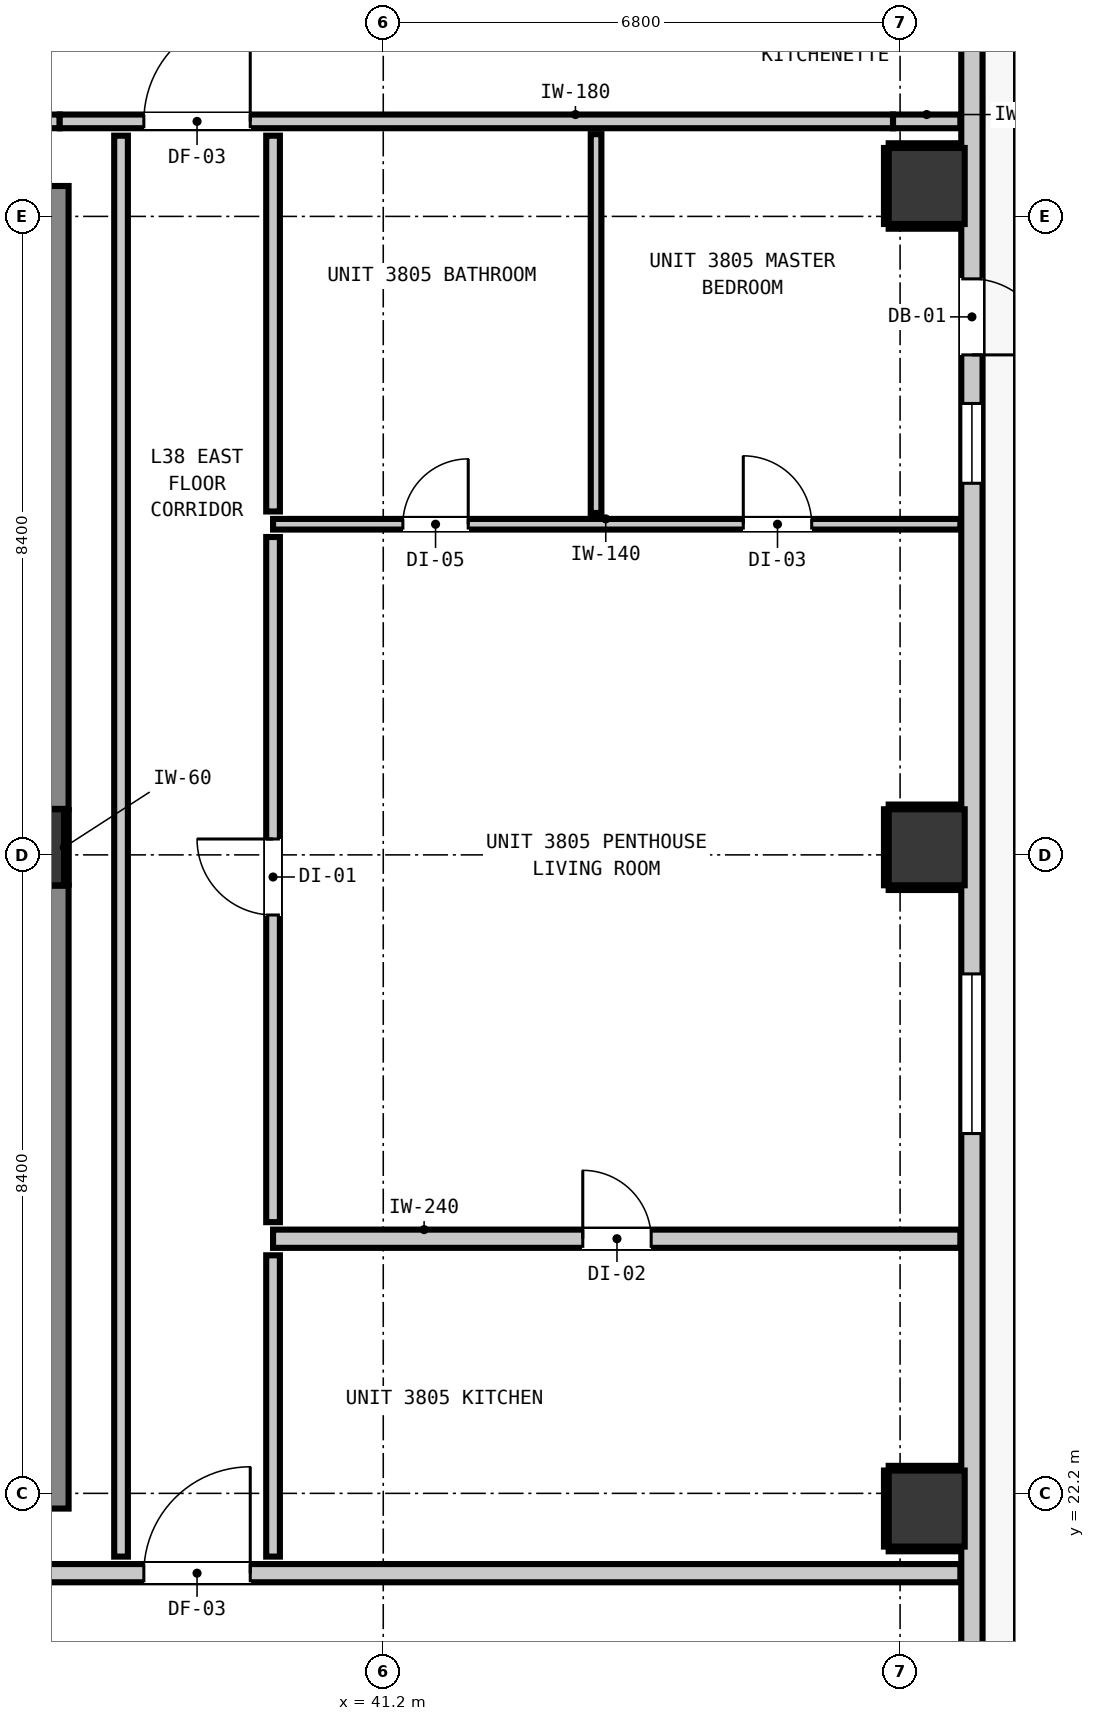
"""IFC4 building model, lengths in metres.
Left out: names, types, materials, properties, quantities, classifications, styles, units other than length and angle.
Written with IfcOpenShell. Run it as: python <this file> out.ifc"""

import sys

from ifc_helpers import new_model, si_unit, direction, frame, frame_2d, origin, origin_2d, place, context, subcontext, project, spatial, rectangle, extrude, element, fill, save


model = new_model("IFC4")
c1 = context("Model", 3, precision=1e-05, world=origin(), true_north=direction((0.0, 1.0)))
c2 = subcontext(c1, "Body", "Model", "MODEL_VIEW")
j1 = project(units=[si_unit("LENGTHUNIT", "METRE"), si_unit("PLANEANGLEUNIT", "RADIAN")], contexts=[c1])
p1 = place(None, origin())
s1 = spatial("IfcSite", under=j1, at=p1, CompositionType="ELEMENT")
p2 = place(p1, origin())
s2 = spatial("IfcBuilding", under=s1, at=p2, CompositionType="ELEMENT")
p3 = place(p2, frame((0.0, 0.0, 132.64)))
s3 = spatial("IfcBuildingStorey", under=s2, at=p3, CompositionType="ELEMENT", Elevation=132.64)
p4 = place(p3, frame((36.5, 30.7, 0.0), z_axis=(0.0, 0.0, 1.0), x_axis=(1.0, 0.0, 0.0)))
e1 = element("IfcColumn", 1, at=p4, inside=s3, PredefinedType="COLUMN", context=c2, shape_type="SweptSolid", body=[
    extrude(rectangle(XDim=1.0, YDim=1.0, at=origin_2d()), origin(), (0.0, 0.0, 1.0), 3.32),
])
p5 = place(p3, frame((36.56, 22.0, 0.0), z_axis=(0.0, 0.0, 1.0), x_axis=(0.0, 1.0, 0.0)))
e2 = element("IfcWall", 2, at=p5, inside=s3, PredefinedType="SHEAR", context=c2, shape_type="SweptSolid", body=[
    extrude(rectangle(XDim=8.195, YDim=1.0, at=frame_2d((4.098, 0.0))), origin(), (0.0, 0.0, 1.0), 3.32),
])
p6 = place(p3, frame((36.56, 31.205, 0.0), z_axis=(0.0, 0.0, 1.0), x_axis=(0.0, 1.0, 0.0)))
e3 = element("IfcWall", 3, at=p6, inside=s3, PredefinedType="SHEAR", context=c2, shape_type="SweptSolid", body=[
    extrude(rectangle(XDim=8.195, YDim=1.0, at=frame_2d((4.097, 0.0))), origin(), (0.0, 0.0, 1.0), 3.32),
])
for number, where, z_axis, x_axis in (
    (4, (48.35, 22.0, 0.0), (0.0, 0.0, 1.0), (1.0, 0.0, 0.0)),
    (5, (48.35, 30.7, 0.0), (0.0, 0.0, 1.0), (1.0, 0.0, 0.0)),
    (6, (48.35, 39.4, 0.0), (0.0, 0.0, 1.0), (1.0, 0.0, 0.0)),
):
    element("IfcColumn", number, at=place(p3, frame(where, z_axis=z_axis, x_axis=x_axis)), inside=s3, PredefinedType="COLUMN", context=c2, shape_type="SweptSolid", body=[
        extrude(rectangle(XDim=1.0, YDim=1.0, at=origin_2d()), origin(), (0.0, 0.0, 1.0), 3.32),
    ])
p7 = place(p3, frame((48.945, 43.645, 0.0), z_axis=(0.0, 0.0, 1.0), x_axis=(0.0, -1.0, 0.0)))
e7 = element("IfcWall", 7, at=p7, inside=s3, PredefinedType="STANDARD", context=c2, shape_type="SweptSolid", body=[
    extrude(rectangle(XDim=32.29, YDim=0.28, at=frame_2d((16.145, 0.0))), origin(), (0.0, 0.0, 1.0), 3.08),
])
p8 = place(p7, frame((5.467, 0.0, 0.0)))
e8 = element("IfcOpeningElement", 8, at=p8, cuts=e7, PredefinedType="OPENING", context=c2, shape_type="SweptSolid", body=[
    extrude(rectangle(XDim=1.0, YDim=2.15, at=frame_2d((0.5, 1.075))), frame((0.0, 0.15, 0.0), z_axis=(0.0, -1.0, 0.0), x_axis=(1.0, 0.0, 0.0)), (0.0, 0.0, 1.0), 0.3),
])
p9 = place(p7, frame((30.696, 0.0, 0.85)))
e9 = element("IfcOpeningElement", 9, at=p9, cuts=e7, PredefinedType="OPENING", context=c2, shape_type="SweptSolid", body=[
    extrude(rectangle(XDim=1.05, YDim=1.65, at=frame_2d((0.525, 0.825))), frame((0.0, 0.15, 0.0), z_axis=(0.0, -1.0, 0.0), x_axis=(1.0, 0.0, 0.0)), (0.0, 0.0, 1.0), 0.3),
])
p10 = place(p7, frame((14.611, 0.0, 0.85)))
e10 = element("IfcOpeningElement", 10, at=p10, cuts=e7, PredefinedType="OPENING", context=c2, shape_type="SweptSolid", body=[
    extrude(rectangle(XDim=2.1, YDim=1.9, at=frame_2d((1.05, 0.95))), frame((0.0, 0.15, 0.0), z_axis=(0.0, -1.0, 0.0), x_axis=(1.0, 0.0, 0.0)), (0.0, 0.0, 1.0), 0.3),
])
p11 = place(p7, frame((7.106, 0.0, 0.85)))
e11 = element("IfcOpeningElement", 11, at=p11, cuts=e7, PredefinedType="OPENING", context=c2, shape_type="SweptSolid", body=[
    extrude(rectangle(XDim=1.05, YDim=1.65, at=frame_2d((0.525, 0.825))), frame((0.0, 0.15, 0.0), z_axis=(0.0, -1.0, 0.0), x_axis=(1.0, 0.0, 0.0)), (0.0, 0.0, 1.0), 0.3),
])
p12 = place(p3, frame((9.407, 21.15, 0.0), z_axis=(0.0, 0.0, 1.0), x_axis=(1.0, 0.0, 0.0)))
e12 = element("IfcWall", 12, at=p12, inside=s3, PredefinedType="PARTITIONING", context=c2, shape_type="SweptSolid", body=[
    extrude(rectangle(XDim=39.386, YDim=0.24, at=frame_2d((19.693, 0.0))), origin(), (0.0, 0.0, 1.0), 3.08),
])
p13 = place(p12, frame((8.803, 0.0, 0.0)))
e13 = element("IfcOpeningElement", 13, at=p13, cuts=e12, PredefinedType="OPENING", context=c2, shape_type="SweptSolid", body=[
    extrude(rectangle(XDim=1.1, YDim=2.15, at=frame_2d((0.55, 1.075))), frame((0.0, 0.13, 0.0), z_axis=(0.0, -1.0, 0.0), x_axis=(1.0, 0.0, 0.0)), (0.0, 0.0, 1.0), 0.26),
])
p14 = place(p12, frame((1.192, 0.0, 0.0)))
e14 = element("IfcOpeningElement", 14, at=p14, cuts=e12, PredefinedType="OPENING", context=c2, shape_type="SweptSolid", body=[
    extrude(rectangle(XDim=1.4, YDim=2.15, at=frame_2d((0.7, 1.075))), frame((0.0, 0.13, 0.0), z_axis=(0.0, -1.0, 0.0), x_axis=(1.0, 0.0, 0.0)), (0.0, 0.0, 1.0), 0.26),
])
p15 = place(p12, frame((28.643, 0.0, 0.0)))
e15 = element("IfcOpeningElement", 15, at=p15, cuts=e12, PredefinedType="OPENING", context=c2, shape_type="SweptSolid", body=[
    extrude(rectangle(XDim=1.4, YDim=2.15, at=frame_2d((0.7, 1.075))), frame((0.0, 0.13, 0.0), z_axis=(0.0, -1.0, 0.0), x_axis=(1.0, 0.0, 0.0)), (0.0, 0.0, 1.0), 0.26),
])
p16 = place(p3, frame((39.75, 25.55, 0.0), z_axis=(0.0, 0.0, 1.0), x_axis=(1.0, 0.0, 0.0)))
e16 = element("IfcWall", 16, at=p16, inside=s3, PredefinedType="PARTITIONING", context=c2, shape_type="SweptSolid", body=[
    extrude(rectangle(XDim=9.043, YDim=0.24, at=frame_2d((4.521, 0.0))), origin(), (0.0, 0.0, 1.0), 3.08),
])
p17 = place(p16, frame((4.075, 0.0, 0.0)))
e17 = element("IfcOpeningElement", 17, at=p17, cuts=e16, PredefinedType="OPENING", context=c2, shape_type="SweptSolid", body=[
    extrude(rectangle(XDim=0.9, YDim=2.1, at=frame_2d((0.45, 1.05))), frame((0.0, 0.13, 0.0), z_axis=(0.0, -1.0, 0.0), x_axis=(1.0, 0.0, 0.0)), (0.0, 0.0, 1.0), 0.26),
])
p18 = place(p3, frame((9.407, 40.25, 0.0), z_axis=(0.0, 0.0, 1.0), x_axis=(1.0, 0.0, 0.0)))
e18 = element("IfcWall", 18, at=p18, inside=s3, PredefinedType="PARTITIONING", context=c2, shape_type="SweptSolid", body=[
    extrude(rectangle(XDim=27.536, YDim=0.18, at=frame_2d((13.768, 0.0))), origin(), (0.0, 0.0, 1.0), 3.08),
])
p19 = place(p18, frame((8.028, 0.0, 0.0)))
e19 = element("IfcOpeningElement", 19, at=p19, cuts=e18, PredefinedType="OPENING", context=c2, shape_type="SweptSolid", body=[
    extrude(rectangle(XDim=1.4, YDim=2.15, at=frame_2d((0.7, 1.075))), frame((0.0, 0.1, 0.0), z_axis=(0.0, -1.0, 0.0), x_axis=(1.0, 0.0, 0.0)), (0.0, 0.0, 1.0), 0.2),
])
p20 = place(p18, frame((1.192, 0.0, 0.0)))
e20 = element("IfcOpeningElement", 20, at=p20, cuts=e18, PredefinedType="OPENING", context=c2, shape_type="SweptSolid", body=[
    extrude(rectangle(XDim=1.4, YDim=2.15, at=frame_2d((0.7, 1.075))), frame((0.0, 0.1, 0.0), z_axis=(0.0, -1.0, 0.0), x_axis=(1.0, 0.0, 0.0)), (0.0, 0.0, 1.0), 0.2),
])
p21 = place(p3, frame((36.943, 40.25, 0.0), z_axis=(0.0, 0.0, 1.0), x_axis=(1.0, 0.0, 0.0)))
e21 = element("IfcWall", 21, at=p21, inside=s3, PredefinedType="PARTITIONING", context=c2, shape_type="SweptSolid", body=[
    extrude(rectangle(XDim=10.964, YDim=0.18, at=frame_2d((5.482, 0.0))), origin(), (0.0, 0.0, 1.0), 2.565),
])
p22 = place(p21, frame((1.107, 0.0, 0.0)))
e22 = element("IfcOpeningElement", 22, at=p22, cuts=e21, PredefinedType="OPENING", context=c2, shape_type="SweptSolid", body=[
    extrude(rectangle(XDim=1.4, YDim=2.15, at=frame_2d((0.7, 1.075))), frame((0.0, 0.1, 0.0), z_axis=(0.0, -1.0, 0.0), x_axis=(1.0, 0.0, 0.0)), (0.0, 0.0, 1.0), 0.2),
])
p23 = place(p3, frame((47.907, 40.25, 0.0), z_axis=(0.0, 0.0, 1.0), x_axis=(1.0, 0.0, 0.0)))
e23 = element("IfcWall", 23, at=p23, inside=s3, PredefinedType="PARTITIONING", context=c2, shape_type="SweptSolid", body=[
    extrude(rectangle(XDim=0.886, YDim=0.18, at=frame_2d((0.443, 0.0))), origin(), (0.0, 0.0, 1.0), 3.08),
])
p24 = place(p3, frame((39.75, 34.95, 0.0), z_axis=(0.0, 0.0, 1.0), x_axis=(1.0, 0.0, 0.0)))
e24 = element("IfcWall", 24, at=p24, inside=s3, PredefinedType="PARTITIONING", context=c2, shape_type="SweptSolid", body=[
    extrude(rectangle(XDim=9.043, YDim=0.14, at=frame_2d((4.521, 0.0))), origin(), (0.0, 0.0, 1.0), 3.08),
])
p25 = place(p24, frame((1.708, 0.0, 0.0)))
e25 = element("IfcOpeningElement", 25, at=p25, cuts=e24, PredefinedType="OPENING", context=c2, shape_type="SweptSolid", body=[
    extrude(rectangle(XDim=0.86, YDim=2.02, at=frame_2d((0.43, 1.01))), frame((0.0, 0.08, 0.0), z_axis=(0.0, -1.0, 0.0), x_axis=(1.0, 0.0, 0.0)), (0.0, 0.0, 1.0), 0.16),
])
p26 = place(p24, frame((6.187, 0.0, 0.0)))
e26 = element("IfcOpeningElement", 26, at=p26, cuts=e24, PredefinedType="OPENING", context=c2, shape_type="SweptSolid", body=[
    extrude(rectangle(XDim=0.9, YDim=2.1, at=frame_2d((0.45, 1.05))), frame((0.0, 0.08, 0.0), z_axis=(0.0, -1.0, 0.0), x_axis=(1.0, 0.0, 0.0)), (0.0, 0.0, 1.0), 0.16),
])
p27 = place(p3, frame((37.75, 21.368, 0.0), z_axis=(0.0, 0.0, 1.0), x_axis=(0.0, 1.0, 0.0)))
e27 = element("IfcWall", 27, at=p27, inside=s3, PredefinedType="PARTITIONING", context=c2, shape_type="SweptSolid", body=[
    extrude(rectangle(XDim=18.694, YDim=0.18, at=frame_2d((9.347, 0.0))), origin(), (0.0, 0.0, 1.0), 3.08),
])
p28 = place(p3, frame((39.75, 21.368, 0.0), z_axis=(0.0, 0.0, 1.0), x_axis=(0.0, 1.0, 0.0)))
e28 = element("IfcWall", 28, at=p28, inside=s3, PredefinedType="PARTITIONING", context=c2, shape_type="SweptSolid", body=[
    extrude(rectangle(XDim=3.964, YDim=0.18, at=frame_2d((1.982, 0.0))), origin(), (0.0, 0.0, 1.0), 3.08),
])
p29 = place(p3, frame((39.75, 25.768, 0.0), z_axis=(0.0, 0.0, 1.0), x_axis=(0.0, 1.0, 0.0)))
e29 = element("IfcWall", 29, at=p29, inside=s3, PredefinedType="PARTITIONING", context=c2, shape_type="SweptSolid", body=[
    extrude(rectangle(XDim=9.014, YDim=0.18, at=frame_2d((4.507, 0.0))), origin(), (0.0, 0.0, 1.0), 3.08),
])
p30 = place(p29, frame((4.041, 0.0, 0.0)))
e30 = element("IfcOpeningElement", 30, at=p30, cuts=e29, PredefinedType="OPENING", context=c2, shape_type="SweptSolid", body=[
    extrude(rectangle(XDim=1.0, YDim=2.15, at=frame_2d((0.5, 1.075))), frame((0.0, 0.1, 0.0), z_axis=(0.0, -1.0, 0.0), x_axis=(1.0, 0.0, 0.0)), (0.0, 0.0, 1.0), 0.2),
])
p31 = place(p3, frame((39.75, 35.118, 0.0), z_axis=(0.0, 0.0, 1.0), x_axis=(0.0, 1.0, 0.0)))
e31 = element("IfcWall", 31, at=p31, inside=s3, PredefinedType="PARTITIONING", context=c2, shape_type="SweptSolid", body=[
    extrude(rectangle(XDim=4.944, YDim=0.18, at=frame_2d((2.472, 0.0))), origin(), (0.0, 0.0, 1.0), 3.08),
])
p32 = place(p3, frame((44.0, 35.098, 0.0), z_axis=(0.0, 0.0, 1.0), x_axis=(0.0, 1.0, 0.0)))
e32 = element("IfcWall", 32, at=p32, inside=s3, PredefinedType="PARTITIONING", context=c2, shape_type="SweptSolid", body=[
    extrude(rectangle(XDim=4.984, YDim=0.14, at=frame_2d((2.492, 0.0))), origin(), (0.0, 0.0, 1.0), 3.08),
])
p33 = place(p3, frame((37.032, 30.21, 0.0), z_axis=(0.0, 0.0, 1.0), x_axis=(0.0, 1.0, 0.0)))
e33 = element("IfcWall", 33, at=p33, inside=s3, PredefinedType="PARTITIONING", context=c2, shape_type="SweptSolid", body=[
    extrude(rectangle(XDim=0.98, YDim=0.06, at=frame_2d((0.49, 0.0))), origin(), (0.0, 0.0, 1.0), 1.45),
])
for number, where, z_axis, x_axis in (
    (34, (47.85, 21.468, 0.0), (0.0, 0.0, 1.0), (1.0, 0.0, 0.0)),
    (35, (47.85, 22.532, 0.0), (0.0, 0.0, 1.0), (1.0, 0.0, 0.0)),
):
    element("IfcWall", number, at=place(p3, frame(where, z_axis=z_axis, x_axis=x_axis)), inside=s3, PredefinedType="PARTITIONING", context=c2, shape_type="SweptSolid", body=[
        extrude(rectangle(XDim=0.94, YDim=0.06, at=frame_2d((0.47, 0.0))), origin(), (0.0, 0.0, 1.0), 1.45),
    ])
p34 = place(p3, frame((47.818, 21.5, 0.0), z_axis=(0.0, 0.0, 1.0), x_axis=(0.0, 1.0, 0.0)))
e36 = element("IfcWall", 36, at=p34, inside=s3, PredefinedType="PARTITIONING", context=c2, shape_type="SweptSolid", body=[
    extrude(rectangle(XDim=1.0, YDim=0.06, at=frame_2d((0.5, 0.0))), origin(), (0.0, 0.0, 1.0), 1.45),
])
for number, where, z_axis, x_axis in (
    (37, (47.85, 30.168, 0.0), (0.0, 0.0, 1.0), (1.0, 0.0, 0.0)),
    (38, (47.85, 31.232, 0.0), (0.0, 0.0, 1.0), (1.0, 0.0, 0.0)),
):
    element("IfcWall", number, at=place(p3, frame(where, z_axis=z_axis, x_axis=x_axis)), inside=s3, PredefinedType="PARTITIONING", context=c2, shape_type="SweptSolid", body=[
        extrude(rectangle(XDim=0.94, YDim=0.06, at=frame_2d((0.47, 0.0))), origin(), (0.0, 0.0, 1.0), 1.45),
    ])
p35 = place(p3, frame((47.818, 30.2, 0.0), z_axis=(0.0, 0.0, 1.0), x_axis=(0.0, 1.0, 0.0)))
e39 = element("IfcWall", 39, at=p35, inside=s3, PredefinedType="PARTITIONING", context=c2, shape_type="SweptSolid", body=[
    extrude(rectangle(XDim=1.0, YDim=0.06, at=frame_2d((0.5, 0.0))), origin(), (0.0, 0.0, 1.0), 1.45),
])
for number, where, z_axis, x_axis in (
    (40, (47.85, 38.868, 0.0), (0.0, 0.0, 1.0), (1.0, 0.0, 0.0)),
    (41, (47.85, 39.932, 0.0), (0.0, 0.0, 1.0), (1.0, 0.0, 0.0)),
):
    element("IfcWall", number, at=place(p3, frame(where, z_axis=z_axis, x_axis=x_axis)), inside=s3, PredefinedType="PARTITIONING", context=c2, shape_type="SweptSolid", body=[
        extrude(rectangle(XDim=0.94, YDim=0.06, at=frame_2d((0.47, 0.0))), origin(), (0.0, 0.0, 1.0), 1.45),
    ])
p36 = place(p3, frame((47.818, 38.9, 0.0), z_axis=(0.0, 0.0, 1.0), x_axis=(0.0, 1.0, 0.0)))
e42 = element("IfcWall", 42, at=p36, inside=s3, PredefinedType="PARTITIONING", context=c2, shape_type="SweptSolid", body=[
    extrude(rectangle(XDim=1.0, YDim=0.06, at=frame_2d((0.5, 0.0))), origin(), (0.0, 0.0, 1.0), 1.45),
])
p37 = place(p8, origin())
e43 = element("IfcDoor", 43, at=p37, inside=s3, OperationType="SINGLE_SWING_RIGHT", PredefinedType="DOOR", context=c2, shape_type="SweptSolid", body=[
    extrude(rectangle(XDim=1.0, YDim=2.15, at=frame_2d((0.5, 1.075))), frame((0.0, 0.025, 0.0), z_axis=(0.0, -1.0, 0.0), x_axis=(1.0, 0.0, 0.0)), (0.0, 0.0, 1.0), 0.05),
])
fill(e8, e43)
p38 = place(p10, origin())
e44 = element("IfcWindow", 44, at=p38, inside=s3, PartitioningType="SINGLE_PANEL", PredefinedType="WINDOW", context=c2, shape_type="SweptSolid", body=[
    extrude(rectangle(XDim=2.1, YDim=1.9, at=frame_2d((1.05, 0.95))), frame((0.0, 0.03, 0.0), z_axis=(0.0, -1.0, 0.0), x_axis=(1.0, 0.0, 0.0)), (0.0, 0.0, 1.0), 0.06),
])
fill(e10, e44)
p39 = place(p11, origin())
e45 = element("IfcWindow", 45, at=p39, inside=s3, PartitioningType="SINGLE_PANEL", PredefinedType="WINDOW", context=c2, shape_type="SweptSolid", body=[
    extrude(rectangle(XDim=1.05, YDim=1.65, at=frame_2d((0.525, 0.825))), frame((0.0, 0.03, 0.0), z_axis=(0.0, -1.0, 0.0), x_axis=(1.0, 0.0, 0.0)), (0.0, 0.0, 1.0), 0.06),
])
fill(e11, e45)
p40 = place(p15, origin())
e46 = element("IfcDoor", 46, at=p40, inside=s3, OperationType="SINGLE_SWING_RIGHT", PredefinedType="DOOR", context=c2, shape_type="SweptSolid", body=[
    extrude(rectangle(XDim=1.4, YDim=2.15, at=frame_2d((0.7, 1.075))), frame((0.0, 0.025, 0.0), z_axis=(0.0, -1.0, 0.0), x_axis=(1.0, 0.0, 0.0)), (0.0, 0.0, 1.0), 0.05),
])
fill(e15, e46)
p41 = place(p22, origin())
e47 = element("IfcDoor", 47, at=p41, inside=s3, OperationType="SINGLE_SWING_RIGHT", PredefinedType="DOOR", context=c2, shape_type="SweptSolid", body=[
    extrude(rectangle(XDim=1.4, YDim=2.15, at=frame_2d((0.7, 1.075))), frame((0.0, 0.025, 0.0), z_axis=(0.0, -1.0, 0.0), x_axis=(1.0, 0.0, 0.0)), (0.0, 0.0, 1.0), 0.05),
])
fill(e22, e47)
p42 = place(p30, origin())
e48 = element("IfcDoor", 48, at=p42, inside=s3, OperationType="SINGLE_SWING_RIGHT", PredefinedType="DOOR", context=c2, shape_type="SweptSolid", body=[
    extrude(rectangle(XDim=1.0, YDim=2.15, at=frame_2d((0.5, 1.075))), frame((0.0, 0.025, 0.0), z_axis=(0.0, -1.0, 0.0), x_axis=(1.0, 0.0, 0.0)), (0.0, 0.0, 1.0), 0.05),
])
fill(e30, e48)
p43 = place(p17, origin())
e49 = element("IfcDoor", 49, at=p43, inside=s3, OperationType="SINGLE_SWING_LEFT", PredefinedType="DOOR", context=c2, shape_type="SweptSolid", body=[
    extrude(rectangle(XDim=0.9, YDim=2.1, at=frame_2d((0.45, 1.05))), frame((0.0, 0.025, 0.0), z_axis=(0.0, -1.0, 0.0), x_axis=(1.0, 0.0, 0.0)), (0.0, 0.0, 1.0), 0.05),
])
fill(e17, e49)
p44 = place(p25, origin())
e50 = element("IfcDoor", 50, at=p44, inside=s3, OperationType="SINGLE_SWING_RIGHT", PredefinedType="DOOR", context=c2, shape_type="SweptSolid", body=[
    extrude(rectangle(XDim=0.86, YDim=2.02, at=frame_2d((0.43, 1.01))), frame((0.0, 0.025, 0.0), z_axis=(0.0, -1.0, 0.0), x_axis=(1.0, 0.0, 0.0)), (0.0, 0.0, 1.0), 0.05),
])
fill(e25, e50)
p45 = place(p26, origin())
e51 = element("IfcDoor", 51, at=p45, inside=s3, OperationType="SINGLE_SWING_LEFT", PredefinedType="DOOR", context=c2, shape_type="SweptSolid", body=[
    extrude(rectangle(XDim=0.9, YDim=2.1, at=frame_2d((0.45, 1.05))), frame((0.0, 0.025, 0.0), z_axis=(0.0, -1.0, 0.0), x_axis=(1.0, 0.0, 0.0)), (0.0, 0.0, 1.0), 0.05),
])
fill(e26, e51)
save(model, sys.argv[1])
